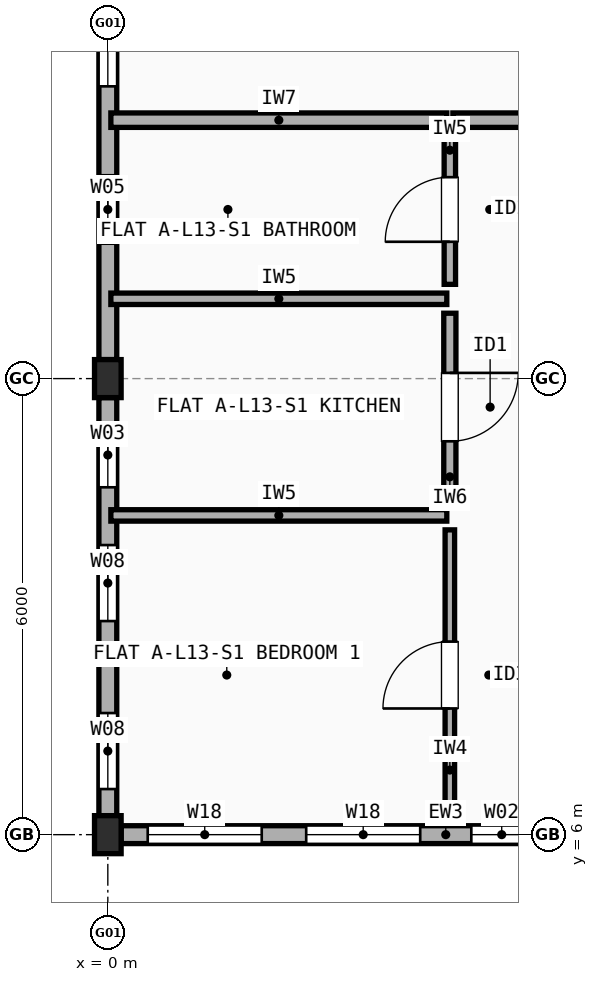
"""IFC4 building model, lengths in metres.
Left out: names, types, materials, properties, quantities, classifications, styles, units other than length and angle.
Written with IfcOpenShell. Run it as: python <this file> out.ifc"""

import sys

from ifc_helpers import new_model, si_unit, direction, frame, frame_2d, origin, origin_2d, place, context, subcontext, project, spatial, rectangle, extrude, element, fill, save


model = new_model("IFC4")
c1 = context("Model", 3, precision=1e-05, world=origin(), true_north=direction((0.0, 1.0)))
c2 = subcontext(c1, "Body", "Model", "MODEL_VIEW")
j1 = project(units=[si_unit("LENGTHUNIT", "METRE"), si_unit("PLANEANGLEUNIT", "RADIAN")], contexts=[c1])
p1 = place(None, origin())
s1 = spatial("IfcSite", under=j1, at=p1, CompositionType="ELEMENT")
p2 = place(p1, origin())
s2 = spatial("IfcBuilding", under=s1, at=p2, CompositionType="ELEMENT")
p3 = place(p2, frame((0.0, 0.0, 42.9)))
s3 = spatial("IfcBuildingStorey", under=s2, at=p3, CompositionType="ELEMENT", Elevation=42.9)
for number, where, z_axis, x_axis in (
    (1, (0.0, 6.0, 0.0), (0.0, 0.0, 1.0), (1.0, 0.0, 0.0)),
    (2, (0.0, 12.0, 0.0), (0.0, 0.0, 1.0), (1.0, 0.0, 0.0)),
):
    element("IfcColumn", number, at=place(p3, frame(where, z_axis=z_axis, x_axis=x_axis)), inside=s3, PredefinedType="COLUMN", context=c2, shape_type="SweptSolid", body=[
        extrude(rectangle(XDim=0.35, YDim=0.5, at=origin_2d()), origin(), (0.0, 0.0, 1.0), 3.005),
    ])
p4 = place(p3, frame((0.175, 6.0, 0.0), z_axis=(0.0, 0.0, 1.0), x_axis=(1.0, 0.0, 0.0)))
e3 = element("IfcWall", 3, at=p4, inside=s3, PredefinedType="STANDARD", context=c2, shape_type="SweptSolid", body=[
    extrude(rectangle(XDim=5.65, YDim=0.235, at=frame_2d((2.825, 0.0))), origin(), (0.0, 0.0, 1.0), 2.487),
])
p5 = place(p4, frame((0.35, 0.0, 0.9)))
e4 = element("IfcOpeningElement", 4, at=p5, cuts=e3, PredefinedType="OPENING", context=c2, shape_type="SweptSolid", body=[
    extrude(rectangle(XDim=1.5, YDim=1.4, at=frame_2d((0.75, 0.7))), frame((0.0, 0.127, 0.0), z_axis=(0.0, -1.0, 0.0), x_axis=(1.0, 0.0, 0.0)), (0.0, 0.0, 1.0), 0.255),
])
p6 = place(p4, frame((2.435, 0.0, 0.9)))
e5 = element("IfcOpeningElement", 5, at=p6, cuts=e3, PredefinedType="OPENING", context=c2, shape_type="SweptSolid", body=[
    extrude(rectangle(XDim=1.5, YDim=1.4, at=frame_2d((0.75, 0.7))), frame((0.0, 0.127, 0.0), z_axis=(0.0, -1.0, 0.0), x_axis=(1.0, 0.0, 0.0)), (0.0, 0.0, 1.0), 0.255),
])
p7 = place(p4, frame((4.607, 0.0, 0.9)))
e6 = element("IfcOpeningElement", 6, at=p7, cuts=e3, PredefinedType="OPENING", context=c2, shape_type="SweptSolid", body=[
    extrude(rectangle(XDim=0.8, YDim=1.2, at=frame_2d((0.4, 0.6))), frame((0.0, 0.127, 0.0), z_axis=(0.0, -1.0, 0.0), x_axis=(1.0, 0.0, 0.0)), (0.0, 0.0, 1.0), 0.255),
])
p8 = place(p3, frame((0.0, 17.75, 0.0), z_axis=(0.0, 0.0, 1.0), x_axis=(0.0, -1.0, 0.0)))
e7 = element("IfcWall", 7, at=p8, inside=s3, PredefinedType="STANDARD", context=c2, shape_type="SweptSolid", body=[
    extrude(rectangle(XDim=5.5, YDim=0.235, at=frame_2d((2.75, 0.0))), origin(), (0.0, 0.0, 1.0), 2.487),
])
p9 = place(p8, frame((0.405, 0.0, 0.9)))
e8 = element("IfcOpeningElement", 8, at=p9, cuts=e7, PredefinedType="OPENING", context=c2, shape_type="SweptSolid", body=[
    extrude(rectangle(XDim=1.5, YDim=1.4, at=frame_2d((0.75, 0.7))), frame((0.0, 0.127, 0.0), z_axis=(0.0, -1.0, 0.0), x_axis=(1.0, 0.0, 0.0)), (0.0, 0.0, 1.0), 0.255),
])
p10 = place(p8, frame((3.075, 0.0, 0.9)))
e9 = element("IfcOpeningElement", 9, at=p10, cuts=e7, PredefinedType="OPENING", context=c2, shape_type="SweptSolid", body=[
    extrude(rectangle(XDim=0.9, YDim=1.4, at=frame_2d((0.45, 0.7))), frame((0.0, 0.127, 0.0), z_axis=(0.0, -1.0, 0.0), x_axis=(1.0, 0.0, 0.0)), (0.0, 0.0, 1.0), 0.255),
])
p11 = place(p3, frame((0.0, 11.75, 0.0), z_axis=(0.0, 0.0, 1.0), x_axis=(0.0, -1.0, 0.0)))
e10 = element("IfcWall", 10, at=p11, inside=s3, PredefinedType="STANDARD", context=c2, shape_type="SweptSolid", body=[
    extrude(rectangle(XDim=5.5, YDim=0.235, at=frame_2d((2.75, 0.0))), origin(), (0.0, 0.0, 1.0), 2.487),
])
p12 = place(p11, frame((0.33, 0.0, 0.9)))
e11 = element("IfcOpeningElement", 11, at=p12, cuts=e10, PredefinedType="OPENING", context=c2, shape_type="SweptSolid", body=[
    extrude(rectangle(XDim=0.85, YDim=1.25, at=frame_2d((0.425, 0.625))), frame((0.0, 0.127, 0.0), z_axis=(0.0, -1.0, 0.0), x_axis=(1.0, 0.0, 0.0)), (0.0, 0.0, 1.0), 0.255),
])
p13 = place(p11, frame((1.94, 0.0, 0.9)))
e12 = element("IfcOpeningElement", 12, at=p13, cuts=e10, PredefinedType="OPENING", context=c2, shape_type="SweptSolid", body=[
    extrude(rectangle(XDim=1.0, YDim=1.4, at=frame_2d((0.5, 0.7))), frame((0.0, 0.127, 0.0), z_axis=(0.0, -1.0, 0.0), x_axis=(1.0, 0.0, 0.0)), (0.0, 0.0, 1.0), 0.255),
])
p14 = place(p11, frame((4.15, 0.0, 0.9)))
e13 = element("IfcOpeningElement", 13, at=p14, cuts=e10, PredefinedType="OPENING", context=c2, shape_type="SweptSolid", body=[
    extrude(rectangle(XDim=1.0, YDim=1.4, at=frame_2d((0.5, 0.7))), frame((0.0, 0.127, 0.0), z_axis=(0.0, -1.0, 0.0), x_axis=(1.0, 0.0, 0.0)), (0.0, 0.0, 1.0), 0.255),
])
p15 = place(p3, frame((0.04, 15.4, 0.0), z_axis=(0.0, 0.0, 1.0), x_axis=(1.0, 0.0, 0.0)))
e14 = element("IfcWall", 14, at=p15, inside=s3, PredefinedType="SOLIDWALL", context=c2, shape_type="SweptSolid", body=[
    extrude(rectangle(XDim=4.42, YDim=0.19, at=frame_2d((2.21, 0.0))), origin(), (0.0, 0.0, 1.0), 2.487),
])
p16 = place(p3, frame((4.54, 15.4, 0.0), z_axis=(0.0, 0.0, 1.0), x_axis=(1.0, 0.0, 0.0)))
e15 = element("IfcWall", 15, at=p16, inside=s3, PredefinedType="SOLIDWALL", context=c2, shape_type="SweptSolid", body=[
    extrude(rectangle(XDim=4.42, YDim=0.19, at=frame_2d((2.21, 0.0))), origin(), (0.0, 0.0, 1.0), 2.458),
])
p17 = place(p16, frame((1.72, 0.0, 0.0)))
e16 = element("IfcOpeningElement", 16, at=p17, cuts=e15, PredefinedType="OPENING", context=c2, shape_type="SweptSolid", body=[
    extrude(rectangle(XDim=0.98, YDim=2.15, at=frame_2d((0.49, 1.075))), frame((0.0, 0.105, 0.0), z_axis=(0.0, -1.0, 0.0), x_axis=(1.0, 0.0, 0.0)), (0.0, 0.0, 1.0), 0.21),
])
p18 = place(p3, frame((4.5, 6.19, 0.0), z_axis=(0.0, 0.0, 1.0), x_axis=(0.0, 1.0, 0.0)))
e17 = element("IfcWall", 17, at=p18, inside=s3, PredefinedType="PARTITIONING", context=c2, shape_type="SweptSolid", body=[
    extrude(rectangle(XDim=3.82, YDim=0.125, at=frame_2d((1.91, 0.0))), origin(), (0.0, 0.0, 1.0), 3.005),
])
p19 = place(p18, frame((1.47, 0.0, 0.0)))
e18 = element("IfcOpeningElement", 18, at=p19, cuts=e17, PredefinedType="OPENING", context=c2, shape_type="SweptSolid", body=[
    extrude(rectangle(XDim=0.88, YDim=2.1, at=frame_2d((0.44, 1.05))), frame((0.0, 0.073, 0.0), z_axis=(0.0, -1.0, 0.0), x_axis=(1.0, 0.0, 0.0)), (0.0, 0.0, 1.0), 0.145),
])
p20 = place(p3, frame((4.5, 10.39, 0.0), z_axis=(0.0, 0.0, 1.0), x_axis=(0.0, 1.0, 0.0)))
e19 = element("IfcWall", 19, at=p20, inside=s3, PredefinedType="PLUMBINGWALL", context=c2, shape_type="SweptSolid", body=[
    extrude(rectangle(XDim=2.47, YDim=0.16, at=frame_2d((1.235, 0.0))), origin(), (0.0, 0.0, 1.0), 2.537),
])
p21 = place(p20, frame((0.785, 0.0, 0.0)))
e20 = element("IfcOpeningElement", 20, at=p21, cuts=e19, PredefinedType="OPENING", context=c2, shape_type="SweptSolid", body=[
    extrude(rectangle(XDim=0.9, YDim=2.1, at=frame_2d((0.45, 1.05))), frame((0.0, 0.09, 0.0), z_axis=(0.0, -1.0, 0.0), x_axis=(1.0, 0.0, 0.0)), (0.0, 0.0, 1.0), 0.18),
])
p22 = place(p3, frame((4.5, 13.24, 0.0), z_axis=(0.0, 0.0, 1.0), x_axis=(0.0, 1.0, 0.0)))
e21 = element("IfcWall", 21, at=p22, inside=s3, PredefinedType="PARTITIONING", context=c2, shape_type="SweptSolid", body=[
    extrude(rectangle(XDim=1.97, YDim=0.15, at=frame_2d((0.985, 0.0))), origin(), (0.0, 0.0, 1.0), 3.005),
])
p23 = place(p22, frame((0.56, 0.0, 0.0)))
e22 = element("IfcOpeningElement", 22, at=p23, cuts=e21, PredefinedType="OPENING", context=c2, shape_type="SweptSolid", body=[
    extrude(rectangle(XDim=0.85, YDim=2.1, at=frame_2d((0.425, 1.05))), frame((0.0, 0.085, 0.0), z_axis=(0.0, -1.0, 0.0), x_axis=(1.0, 0.0, 0.0)), (0.0, 0.0, 1.0), 0.17),
])
for number, where, z_axis, x_axis in (
    (23, (0.04, 10.2, 0.0), (0.0, 0.0, 1.0), (1.0, 0.0, 0.0)),
    (24, (0.04, 13.05, 0.0), (0.0, 0.0, 1.0), (1.0, 0.0, 0.0)),
):
    element("IfcWall", number, at=place(p3, frame(where, z_axis=z_axis, x_axis=x_axis)), inside=s3, PredefinedType="PARTITIONING", context=c2, shape_type="SweptSolid", body=[
        extrude(rectangle(XDim=4.42, YDim=0.15, at=frame_2d((2.21, 0.0))), origin(), (0.0, 0.0, 1.0), 2.487),
    ])
p24 = place(p5, origin())
e25 = element("IfcWindow", 25, at=p24, inside=s3, PartitioningType="SINGLE_PANEL", PredefinedType="WINDOW", context=c2, shape_type="SweptSolid", body=[
    extrude(rectangle(XDim=1.5, YDim=1.4, at=frame_2d((0.75, 0.7))), frame((0.0, 0.03, 0.0), z_axis=(0.0, -1.0, 0.0), x_axis=(1.0, 0.0, 0.0)), (0.0, 0.0, 1.0), 0.06),
])
fill(e4, e25)
p25 = place(p6, origin())
e26 = element("IfcWindow", 26, at=p25, inside=s3, PartitioningType="SINGLE_PANEL", PredefinedType="WINDOW", context=c2, shape_type="SweptSolid", body=[
    extrude(rectangle(XDim=1.5, YDim=1.4, at=frame_2d((0.75, 0.7))), frame((0.0, 0.03, 0.0), z_axis=(0.0, -1.0, 0.0), x_axis=(1.0, 0.0, 0.0)), (0.0, 0.0, 1.0), 0.06),
])
fill(e5, e26)
p26 = place(p7, origin())
e27 = element("IfcWindow", 27, at=p26, inside=s3, PartitioningType="SINGLE_PANEL", PredefinedType="WINDOW", context=c2, shape_type="SweptSolid", body=[
    extrude(rectangle(XDim=0.8, YDim=1.2, at=frame_2d((0.4, 0.6))), frame((0.0, 0.03, 0.0), z_axis=(0.0, -1.0, 0.0), x_axis=(1.0, 0.0, 0.0)), (0.0, 0.0, 1.0), 0.06),
])
fill(e6, e27)
p27 = place(p9, origin())
e28 = element("IfcWindow", 28, at=p27, inside=s3, PartitioningType="SINGLE_PANEL", PredefinedType="WINDOW", context=c2, shape_type="SweptSolid", body=[
    extrude(rectangle(XDim=1.5, YDim=1.4, at=frame_2d((0.75, 0.7))), frame((0.0, 0.03, 0.0), z_axis=(0.0, -1.0, 0.0), x_axis=(1.0, 0.0, 0.0)), (0.0, 0.0, 1.0), 0.06),
])
fill(e8, e28)
p28 = place(p10, origin())
e29 = element("IfcWindow", 29, at=p28, inside=s3, PartitioningType="SINGLE_PANEL", PredefinedType="WINDOW", context=c2, shape_type="SweptSolid", body=[
    extrude(rectangle(XDim=0.9, YDim=1.4, at=frame_2d((0.45, 0.7))), frame((0.0, 0.03, 0.0), z_axis=(0.0, -1.0, 0.0), x_axis=(1.0, 0.0, 0.0)), (0.0, 0.0, 1.0), 0.06),
])
fill(e9, e29)
p29 = place(p12, origin())
e30 = element("IfcWindow", 30, at=p29, inside=s3, PartitioningType="SINGLE_PANEL", PredefinedType="WINDOW", context=c2, shape_type="SweptSolid", body=[
    extrude(rectangle(XDim=0.85, YDim=1.25, at=frame_2d((0.425, 0.625))), frame((0.0, 0.03, 0.0), z_axis=(0.0, -1.0, 0.0), x_axis=(1.0, 0.0, 0.0)), (0.0, 0.0, 1.0), 0.06),
])
fill(e11, e30)
p30 = place(p13, origin())
e31 = element("IfcWindow", 31, at=p30, inside=s3, PartitioningType="SINGLE_PANEL", PredefinedType="WINDOW", context=c2, shape_type="SweptSolid", body=[
    extrude(rectangle(XDim=1.0, YDim=1.4, at=frame_2d((0.5, 0.7))), frame((0.0, 0.03, 0.0), z_axis=(0.0, -1.0, 0.0), x_axis=(1.0, 0.0, 0.0)), (0.0, 0.0, 1.0), 0.06),
])
fill(e12, e31)
p31 = place(p14, origin())
e32 = element("IfcWindow", 32, at=p31, inside=s3, PartitioningType="SINGLE_PANEL", PredefinedType="WINDOW", context=c2, shape_type="SweptSolid", body=[
    extrude(rectangle(XDim=1.0, YDim=1.4, at=frame_2d((0.5, 0.7))), frame((0.0, 0.03, 0.0), z_axis=(0.0, -1.0, 0.0), x_axis=(1.0, 0.0, 0.0)), (0.0, 0.0, 1.0), 0.06),
])
fill(e13, e32)
p32 = place(p19, origin())
e33 = element("IfcDoor", 33, at=p32, inside=s3, OperationType="SINGLE_SWING_LEFT", PredefinedType="DOOR", context=c2, shape_type="SweptSolid", body=[
    extrude(rectangle(XDim=0.88, YDim=2.1, at=frame_2d((0.44, 1.05))), frame((0.0, 0.025, 0.0), z_axis=(0.0, -1.0, 0.0), x_axis=(1.0, 0.0, 0.0)), (0.0, 0.0, 1.0), 0.05),
])
fill(e18, e33)
p33 = place(p21, origin())
e34 = element("IfcDoor", 34, at=p33, inside=s3, OperationType="SINGLE_SWING_RIGHT", PredefinedType="DOOR", context=c2, shape_type="SweptSolid", body=[
    extrude(rectangle(XDim=0.9, YDim=2.1, at=frame_2d((0.45, 1.05))), frame((0.0, 0.025, 0.0), z_axis=(0.0, -1.0, 0.0), x_axis=(1.0, 0.0, 0.0)), (0.0, 0.0, 1.0), 0.05),
])
fill(e20, e34)
p34 = place(p23, origin())
e35 = element("IfcDoor", 35, at=p34, inside=s3, OperationType="SINGLE_SWING_LEFT", PredefinedType="DOOR", context=c2, shape_type="SweptSolid", body=[
    extrude(rectangle(XDim=0.85, YDim=2.1, at=frame_2d((0.425, 1.05))), frame((0.0, 0.025, 0.0), z_axis=(0.0, -1.0, 0.0), x_axis=(1.0, 0.0, 0.0)), (0.0, 0.0, 1.0), 0.05),
])
fill(e22, e35)
save(model, sys.argv[1])
